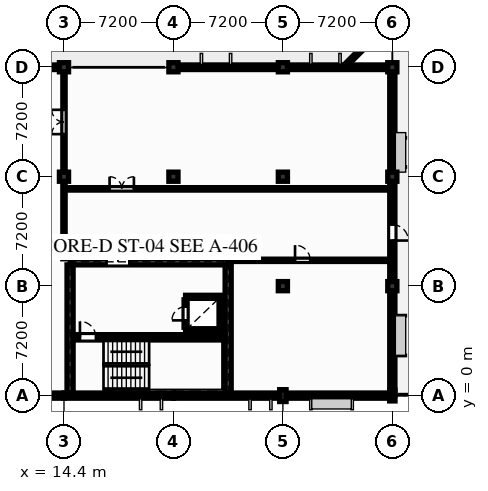
"""IFC4 building model, lengths in metres.
Left out: names, types, materials, properties, quantities, classifications, styles, units other than length and angle.
Written with IfcOpenShell. Run it as: python <this file> out.ifc"""

import sys

from ifc_helpers import new_model, si_unit, direction, frame, frame_2d, origin, origin_2d, place, context, subcontext, project, spatial, rectangle, extrude, element, fill, save


model = new_model("IFC4")
c1 = context("Model", 3, precision=1e-05, world=origin(), true_north=direction((0.0, 1.0)))
c2 = subcontext(c1, "Body", "Model", "MODEL_VIEW")
j1 = project(units=[si_unit("LENGTHUNIT", "METRE"), si_unit("PLANEANGLEUNIT", "RADIAN")], contexts=[c1])
p1 = place(None, origin())
s1 = spatial("IfcSite", under=j1, at=p1, CompositionType="ELEMENT")
p2 = place(p1, origin())
s2 = spatial("IfcBuilding", under=s1, at=p2, CompositionType="ELEMENT")
p3 = place(p2, frame((0.0, 0.0, 8.94)))
s3 = spatial("IfcBuildingStorey", under=s2, at=p3, CompositionType="ELEMENT", Elevation=8.94)
for number, where, z_axis, x_axis in (
    (1, (14.4, 14.4, 0.0), (0.0, 0.0, 1.0), (1.0, 0.0, 0.0)),
    (2, (14.4, 21.6, 0.0), (0.0, 0.0, 1.0), (1.0, 0.0, 0.0)),
    (3, (21.6, 14.4, 0.0), (0.0, 0.0, 1.0), (1.0, 0.0, 0.0)),
    (4, (21.6, 21.6, 0.0), (0.0, 0.0, 1.0), (1.0, 0.0, 0.0)),
):
    element("IfcColumn", number, at=place(p3, frame(where, z_axis=z_axis, x_axis=x_axis)), inside=s3, PredefinedType="COLUMN", context=c2, shape_type="SweptSolid", body=[
        extrude(rectangle(XDim=0.6, YDim=0.6, at=origin_2d()), origin(), (0.0, 0.0, 1.0), 3.84),
    ])
p4 = place(p3, frame((28.8, 0.0, 0.0), z_axis=(0.0, 0.0, 1.0), x_axis=(0.0, 1.0, 0.0)))
e5 = element("IfcColumn", 5, at=p4, inside=s3, PredefinedType="PILASTER", context=c2, shape_type="SweptSolid", body=[
    extrude(rectangle(XDim=0.42, YDim=0.78, at=origin_2d()), origin(), (0.0, 0.0, 1.0), 3.84),
])
for number, where, z_axis, x_axis in (
    (6, (28.8, 7.2, 0.0), (0.0, 0.0, 1.0), (1.0, 0.0, 0.0)),
    (7, (28.8, 14.4, 0.0), (0.0, 0.0, 1.0), (1.0, 0.0, 0.0)),
    (8, (28.8, 21.6, 0.0), (0.0, 0.0, 1.0), (1.0, 0.0, 0.0)),
):
    element("IfcColumn", number, at=place(p3, frame(where, z_axis=z_axis, x_axis=x_axis)), inside=s3, PredefinedType="COLUMN", context=c2, shape_type="SweptSolid", body=[
        extrude(rectangle(XDim=0.6, YDim=0.6, at=origin_2d()), origin(), (0.0, 0.0, 1.0), 3.84),
    ])
p5 = place(p3, frame((36.0, 0.0, 0.0), z_axis=(0.0, 0.0, 1.0), x_axis=(0.0, 1.0, 0.0)))
e9 = element("IfcColumn", 9, at=p5, inside=s3, PredefinedType="PILASTER", context=c2, shape_type="SweptSolid", body=[
    extrude(rectangle(XDim=0.35, YDim=0.7, at=origin_2d()), origin(), (0.0, 0.0, 1.0), 3.84),
])
for number, where, z_axis, x_axis in (
    (10, (36.0, 7.2, 0.0), (0.0, 0.0, 1.0), (1.0, 0.0, 0.0)),
    (11, (36.0, 14.4, 0.0), (0.0, 0.0, 1.0), (1.0, 0.0, 0.0)),
    (12, (36.0, 21.6, 0.0), (0.0, 0.0, 1.0), (1.0, 0.0, 0.0)),
):
    element("IfcColumn", number, at=place(p3, frame(where, z_axis=z_axis, x_axis=x_axis)), inside=s3, PredefinedType="COLUMN", context=c2, shape_type="SweptSolid", body=[
        extrude(rectangle(XDim=0.6, YDim=0.6, at=origin_2d()), origin(), (0.0, 0.0, 1.0), 3.84),
    ])
p6 = place(p3, frame((7.2, 0.0, 0.0), z_axis=(0.0, 0.0, 1.0), x_axis=(1.0, 0.0, 0.0)))
e13 = element("IfcWall", 13, at=p6, inside=s3, PredefinedType="SOLIDWALL", context=c2, shape_type="SweptSolid", body=[
    extrude(rectangle(XDim=7.2, YDim=0.34, at=frame_2d((3.6, 0.0))), origin(), (0.0, 0.0, 1.0), 3.53),
])
p7 = place(p6, frame((2.0, 0.0, 0.85)))
e14 = element("IfcOpeningElement", 14, at=p7, cuts=e13, PredefinedType="OPENING", context=c2, shape_type="SweptSolid", body=[
    extrude(rectangle(XDim=2.4, YDim=2.4, at=frame_2d((1.2, 1.2))), frame((0.0, 0.18, 0.0), z_axis=(0.0, -1.0, 0.0), x_axis=(1.0, 0.0, 0.0)), (0.0, 0.0, 1.0), 0.36),
])
p8 = place(p3, frame((14.4, 0.0, 0.0), z_axis=(0.0, 0.0, 1.0), x_axis=(1.0, 0.0, 0.0)))
e15 = element("IfcWall", 15, at=p8, inside=s3, PredefinedType="SOLIDWALL", context=c2, shape_type="SweptSolid", body=[
    extrude(rectangle(XDim=7.2, YDim=0.34, at=frame_2d((3.6, 0.0))), origin(), (0.0, 0.0, 1.0), 3.53),
])
p9 = place(p8, frame((5.2, 0.0, 1.05)))
e16 = element("IfcOpeningElement", 16, at=p9, cuts=e15, PredefinedType="OPENING", context=c2, shape_type="SweptSolid", body=[
    extrude(rectangle(XDim=1.05, YDim=1.75, at=frame_2d((0.525, 0.875))), frame((0.0, 0.18, 0.0), z_axis=(0.0, -1.0, 0.0), x_axis=(1.0, 0.0, 0.0)), (0.0, 0.0, 1.0), 0.36),
])
p10 = place(p3, frame((21.6, 0.0, 0.0), z_axis=(0.0, 0.0, 1.0), x_axis=(1.0, 0.0, 0.0)))
e17 = element("IfcWall", 17, at=p10, inside=s3, PredefinedType="SOLIDWALL", context=c2, shape_type="SweptSolid", body=[
    extrude(rectangle(XDim=7.2, YDim=0.34, at=frame_2d((3.6, 0.0))), origin(), (0.0, 0.0, 1.0), 3.53),
])
p11 = place(p10, frame((5.2, 0.0, 1.05)))
e18 = element("IfcOpeningElement", 18, at=p11, cuts=e17, PredefinedType="OPENING", context=c2, shape_type="SweptSolid", body=[
    extrude(rectangle(XDim=1.05, YDim=1.75, at=frame_2d((0.525, 0.875))), frame((0.0, 0.18, 0.0), z_axis=(0.0, -1.0, 0.0), x_axis=(1.0, 0.0, 0.0)), (0.0, 0.0, 1.0), 0.36),
])
p12 = place(p3, frame((28.8, 0.0, 0.0), z_axis=(0.0, 0.0, 1.0), x_axis=(1.0, 0.0, 0.0)))
e19 = element("IfcWall", 19, at=p12, inside=s3, PredefinedType="SOLIDWALL", context=c2, shape_type="SweptSolid", body=[
    extrude(rectangle(XDim=7.2, YDim=0.34, at=frame_2d((3.6, 0.0))), origin(), (0.0, 0.0, 1.0), 3.53),
])
p13 = place(p12, frame((2.0, 0.0, 0.355)))
e20 = element("IfcOpeningElement", 20, at=p13, cuts=e19, PredefinedType="OPENING", context=c2, shape_type="SweptSolid", body=[
    extrude(rectangle(XDim=2.4, YDim=2.4, at=frame_2d((1.2, 1.2))), frame((0.0, 0.18, 0.0), z_axis=(0.0, -1.0, 0.0), x_axis=(1.0, 0.0, 0.0)), (0.0, 0.0, 1.0), 0.36),
])
p14 = place(p3, frame((36.0, 0.0, 0.0), z_axis=(0.0, 0.0, 1.0), x_axis=(0.0, 1.0, 0.0)))
e21 = element("IfcWall", 21, at=p14, inside=s3, PredefinedType="SOLIDWALL", context=c2, shape_type="SweptSolid", body=[
    extrude(rectangle(XDim=21.6, YDim=0.34, at=frame_2d((10.8, 0.0))), origin(), (0.0, 0.0, 1.0), 3.53),
])
p15 = place(p14, frame((10.2, 0.0, 0.0)))
e22 = element("IfcOpeningElement", 22, at=p15, cuts=e21, PredefinedType="OPENING", context=c2, shape_type="SweptSolid", body=[
    extrude(rectangle(XDim=1.05, YDim=2.2, at=frame_2d((0.525, 1.1))), frame((0.0, 0.18, 0.0), z_axis=(0.0, -1.0, 0.0), x_axis=(1.0, 0.0, 0.0)), (0.0, 0.0, 1.0), 0.36),
])
p16 = place(p14, frame((2.8, 0.0, 0.9)))
e23 = element("IfcOpeningElement", 23, at=p16, cuts=e21, PredefinedType="OPENING", context=c2, shape_type="SweptSolid", body=[
    extrude(rectangle(XDim=2.3, YDim=1.7, at=frame_2d((1.15, 0.85))), frame((0.0, 0.18, 0.0), z_axis=(0.0, -1.0, 0.0), x_axis=(1.0, 0.0, 0.0)), (0.0, 0.0, 1.0), 0.36),
])
p17 = place(p14, frame((15.2, 0.0, 0.705)))
e24 = element("IfcOpeningElement", 24, at=p17, cuts=e21, PredefinedType="OPENING", context=c2, shape_type="SweptSolid", body=[
    extrude(rectangle(XDim=1.6, YDim=2.05, at=frame_2d((0.8, 1.025))), frame((0.0, 0.18, 0.0), z_axis=(0.0, -1.0, 0.0), x_axis=(1.0, 0.0, 0.0)), (0.0, 0.0, 1.0), 0.36),
])
p18 = place(p3, frame((7.2, 21.6, 0.0), z_axis=(0.0, 0.0, 1.0), x_axis=(1.0, 0.0, 0.0)))
e25 = element("IfcWall", 25, at=p18, inside=s3, PredefinedType="SOLIDWALL", context=c2, shape_type="SweptSolid", body=[
    extrude(rectangle(XDim=7.2, YDim=0.3, at=frame_2d((3.6, 0.0))), origin(), (0.0, 0.0, 1.0), 2.855),
])
p19 = place(p18, frame((2.0, 0.0, 0.685)))
e26 = element("IfcOpeningElement", 26, at=p19, cuts=e25, PredefinedType="OPENING", context=c2, shape_type="SweptSolid", body=[
    extrude(rectangle(XDim=1.6, YDim=2.05, at=frame_2d((0.8, 1.025))), frame((0.0, 0.16, 0.0), z_axis=(0.0, -1.0, 0.0), x_axis=(1.0, 0.0, 0.0)), (0.0, 0.0, 1.0), 0.32),
])
p20 = place(p3, frame((21.6, 21.6, 0.0), z_axis=(0.0, 0.0, 1.0), x_axis=(1.0, 0.0, 0.0)))
e27 = element("IfcWall", 27, at=p20, inside=s3, PredefinedType="SOLIDWALL", context=c2, shape_type="SweptSolid", body=[
    extrude(rectangle(XDim=7.2, YDim=0.3, at=frame_2d((3.6, 0.0))), origin(), (0.0, 0.0, 1.0), 2.855),
])
p21 = place(p20, frame((2.0, 0.0, 0.685)))
e28 = element("IfcOpeningElement", 28, at=p21, cuts=e27, PredefinedType="OPENING", context=c2, shape_type="SweptSolid", body=[
    extrude(rectangle(XDim=1.6, YDim=2.05, at=frame_2d((0.8, 1.025))), frame((0.0, 0.16, 0.0), z_axis=(0.0, -1.0, 0.0), x_axis=(1.0, 0.0, 0.0)), (0.0, 0.0, 1.0), 0.32),
])
p22 = place(p3, frame((28.8, 21.6, 0.0), z_axis=(0.0, 0.0, 1.0), x_axis=(1.0, 0.0, 0.0)))
e29 = element("IfcWall", 29, at=p22, inside=s3, PredefinedType="SOLIDWALL", context=c2, shape_type="SweptSolid", body=[
    extrude(rectangle(XDim=7.2, YDim=0.3, at=frame_2d((3.6, 0.0))), origin(), (0.0, 0.0, 1.0), 2.795),
])
p23 = place(p22, frame((2.0, 0.0, 0.625)))
e30 = element("IfcOpeningElement", 30, at=p23, cuts=e29, PredefinedType="OPENING", context=c2, shape_type="SweptSolid", body=[
    extrude(rectangle(XDim=1.6, YDim=2.05, at=frame_2d((0.8, 1.025))), frame((0.0, 0.16, 0.0), z_axis=(0.0, -1.0, 0.0), x_axis=(1.0, 0.0, 0.0)), (0.0, 0.0, 1.0), 0.32),
])
p24 = place(p3, frame((32.941, 21.741, 0.0), z_axis=(0.0, 0.0, 1.0), x_axis=(0.707106781187, 0.707106781187, 0.0)))
e31 = element("IfcWall", 31, at=p24, inside=s3, PredefinedType="PARAPET", context=c2, shape_type="SweptSolid", body=[
    extrude(rectangle(XDim=4.125, YDim=0.2, at=frame_2d((2.063, 0.0))), origin(), (0.0, 0.0, 1.0), 0.72),
])
p25 = place(p3, frame((14.8, 8.8, 0.0), z_axis=(0.0, 0.0, 1.0), x_axis=(1.0, 0.0, 0.0)))
e32 = element("IfcWall", 32, at=p25, inside=s3, PredefinedType="SHEAR", context=c2, shape_type="SweptSolid", body=[
    extrude(rectangle(XDim=10.4, YDim=0.4, at=frame_2d((5.2, 0.0))), origin(), (0.0, 0.0, 1.0), 3.53),
])
p26 = place(p25, frame((2.4, 0.0, 0.0)))
e33 = element("IfcOpeningElement", 33, at=p26, cuts=e32, PredefinedType="OPENING", context=c2, shape_type="SweptSolid", body=[
    extrude(rectangle(XDim=1.5, YDim=2.2, at=frame_2d((0.75, 1.1))), frame((0.0, 0.21, 0.0), z_axis=(0.0, -1.0, 0.0), x_axis=(1.0, 0.0, 0.0)), (0.0, 0.0, 1.0), 0.42),
])
for number, where, z_axis, x_axis in (
    (34, (14.8, 0.17, 0.0), (0.0, 0.0, 1.0), (0.0, 1.0, 0.0)),
    (35, (25.2, 0.17, 0.0), (0.0, 0.0, 1.0), (0.0, 1.0, 0.0)),
):
    element("IfcWall", number, at=place(p3, frame(where, z_axis=z_axis, x_axis=x_axis)), inside=s3, PredefinedType="SHEAR", context=c2, shape_type="SweptSolid", body=[
        extrude(rectangle(XDim=8.43, YDim=0.4, at=frame_2d((4.215, 0.0))), origin(), (0.0, 0.0, 1.0), 3.53),
    ])
p27 = place(p3, frame((15.0, 3.835, 0.0), z_axis=(0.0, 0.0, 1.0), x_axis=(1.0, 0.0, 0.0)))
e36 = element("IfcWall", 36, at=p27, inside=s3, PredefinedType="SHEAR", context=c2, shape_type="SweptSolid", body=[
    extrude(rectangle(XDim=10.0, YDim=0.35, at=frame_2d((5.0, 0.0))), origin(), (0.0, 0.0, 1.0), 3.53),
])
p28 = place(p27, frame((0.45, 0.0, 0.0)))
e37 = element("IfcOpeningElement", 37, at=p28, cuts=e36, PredefinedType="OPENING", context=c2, shape_type="SweptSolid", body=[
    extrude(rectangle(XDim=1.05, YDim=2.2, at=frame_2d((0.525, 1.1))), frame((0.0, 0.185, 0.0), z_axis=(0.0, -1.0, 0.0), x_axis=(1.0, 0.0, 0.0)), (0.0, 0.0, 1.0), 0.37),
])
for number, where, z_axis, x_axis in (
    (38, (22.4, 4.3, 0.0), (0.0, 0.0, 1.0), (1.0, 0.0, 0.0)),
    (39, (22.4, 6.5, 0.0), (0.0, 0.0, 1.0), (1.0, 0.0, 0.0)),
):
    element("IfcWall", number, at=place(p3, frame(where, z_axis=z_axis, x_axis=x_axis)), inside=s3, PredefinedType="PARTITIONING", context=c2, shape_type="SweptSolid", body=[
        extrude(rectangle(XDim=2.3, YDim=0.2, at=frame_2d((1.15, 0.0))), origin(), (0.0, 0.0, 1.0), 3.53),
    ])
p29 = place(p3, frame((22.4, 4.5, 0.0), z_axis=(0.0, 0.0, 1.0), x_axis=(0.0, 1.0, 0.0)))
e40 = element("IfcWall", 40, at=p29, inside=s3, PredefinedType="PARTITIONING", context=c2, shape_type="SweptSolid", body=[
    extrude(rectangle(XDim=1.8, YDim=0.2, at=frame_2d((0.9, 0.0))), origin(), (0.0, 0.0, 1.0), 3.53),
])
p30 = place(p29, frame((0.45, 0.0, 0.0)))
e41 = element("IfcOpeningElement", 41, at=p30, cuts=e40, PredefinedType="OPENING", context=c2, shape_type="SweptSolid", body=[
    extrude(rectangle(XDim=0.9, YDim=2.1, at=frame_2d((0.45, 1.05))), frame((0.0, 0.11, 0.0), z_axis=(0.0, -1.0, 0.0), x_axis=(1.0, 0.0, 0.0)), (0.0, 0.0, 1.0), 0.22),
])
p31 = place(p3, frame((24.7, 4.5, 0.0), z_axis=(0.0, 0.0, 1.0), x_axis=(0.0, 1.0, 0.0)))
e42 = element("IfcWall", 42, at=p31, inside=s3, PredefinedType="PARTITIONING", context=c2, shape_type="SweptSolid", body=[
    extrude(rectangle(XDim=1.8, YDim=0.2, at=frame_2d((0.9, 0.0))), origin(), (0.0, 0.0, 1.0), 3.53),
])
p32 = place(p3, frame((14.4, 9.0, 0.0), z_axis=(0.0, 0.0, 1.0), x_axis=(0.0, 1.0, 0.0)))
e43 = element("IfcWall", 43, at=p32, inside=s3, PredefinedType="PARTITIONING", context=c2, shape_type="SweptSolid", body=[
    extrude(rectangle(XDim=12.6, YDim=0.15, at=frame_2d((6.3, 0.0))), origin(), (0.0, 0.0, 1.0), 2.755),
])
p33 = place(p32, frame((8.2, 0.0, 0.0)))
e44 = element("IfcOpeningElement", 44, at=p33, cuts=e43, PredefinedType="OPENING", context=c2, shape_type="SweptSolid", body=[
    extrude(rectangle(XDim=1.6, YDim=2.2, at=frame_2d((0.8, 1.1))), frame((0.0, 0.085, 0.0), z_axis=(0.0, -1.0, 0.0), x_axis=(1.0, 0.0, 0.0)), (0.0, 0.0, 1.0), 0.17),
])
p34 = place(p3, frame((14.6, 13.6, 0.0), z_axis=(0.0, 0.0, 1.0), x_axis=(1.0, 0.0, 0.0)))
e45 = element("IfcWall", 45, at=p34, inside=s3, PredefinedType="PARTITIONING", context=c2, shape_type="SweptSolid", body=[
    extrude(rectangle(XDim=21.4, YDim=0.16, at=frame_2d((10.7, 0.0))), origin(), (0.0, 0.0, 1.0), 3.53),
])
p35 = place(p34, frame((2.8, 0.0, 0.0)))
e46 = element("IfcOpeningElement", 46, at=p35, cuts=e45, PredefinedType="OPENING", context=c2, shape_type="SweptSolid", body=[
    extrude(rectangle(XDim=1.6, YDim=2.2, at=frame_2d((0.8, 1.1))), frame((0.0, 0.09, 0.0), z_axis=(0.0, -1.0, 0.0), x_axis=(1.0, 0.0, 0.0)), (0.0, 0.0, 1.0), 0.18),
])
p36 = place(p3, frame((25.4, 8.9, 0.0), z_axis=(0.0, 0.0, 1.0), x_axis=(1.0, 0.0, 0.0)))
e47 = element("IfcWall", 47, at=p36, inside=s3, PredefinedType="PARTITIONING", context=c2, shape_type="SweptSolid", body=[
    extrude(rectangle(XDim=10.6, YDim=0.15, at=frame_2d((5.3, 0.0))), origin(), (0.0, 0.0, 1.0), 3.53),
])
p37 = place(p36, frame((4.2, 0.0, 0.0)))
e48 = element("IfcOpeningElement", 48, at=p37, cuts=e47, PredefinedType="OPENING", context=c2, shape_type="SweptSolid", body=[
    extrude(rectangle(XDim=1.0, YDim=2.15, at=frame_2d((0.5, 1.075))), frame((0.0, 0.085, 0.0), z_axis=(0.0, -1.0, 0.0), x_axis=(1.0, 0.0, 0.0)), (0.0, 0.0, 1.0), 0.17),
])
p38 = place(p9, origin())
e49 = element("IfcWindow", 49, at=p38, inside=s3, PartitioningType="SINGLE_PANEL", PredefinedType="WINDOW", context=c2, shape_type="SweptSolid", body=[
    extrude(rectangle(XDim=1.05, YDim=1.75, at=frame_2d((0.525, 0.875))), frame((0.0, 0.03, 0.0), z_axis=(0.0, -1.0, 0.0), x_axis=(1.0, 0.0, 0.0)), (0.0, 0.0, 1.0), 0.06),
])
fill(e16, e49)
p39 = place(p11, origin())
e50 = element("IfcWindow", 50, at=p39, inside=s3, PartitioningType="SINGLE_PANEL", PredefinedType="WINDOW", context=c2, shape_type="SweptSolid", body=[
    extrude(rectangle(XDim=1.05, YDim=1.75, at=frame_2d((0.525, 0.875))), frame((0.0, 0.03, 0.0), z_axis=(0.0, -1.0, 0.0), x_axis=(1.0, 0.0, 0.0)), (0.0, 0.0, 1.0), 0.06),
])
fill(e18, e50)
p40 = place(p13, origin())
e51 = element("IfcWindow", 51, at=p40, inside=s3, PartitioningType="SINGLE_PANEL", PredefinedType="WINDOW", context=c2, shape_type="SweptSolid", body=[
    extrude(rectangle(XDim=2.4, YDim=2.4, at=frame_2d((1.2, 1.2))), frame((0.0, 0.03, 0.0), z_axis=(0.0, -1.0, 0.0), x_axis=(1.0, 0.0, 0.0)), (0.0, 0.0, 1.0), 0.06),
])
fill(e20, e51)
p41 = place(p15, frame((1.05, 0.0, 0.0), z_axis=(0.0, 0.0, 1.0), x_axis=(-1.0, 0.0, 0.0)))
e52 = element("IfcDoor", 52, at=p41, inside=s3, OperationType="SINGLE_SWING_LEFT", PredefinedType="DOOR", context=c2, shape_type="SweptSolid", body=[
    extrude(rectangle(XDim=1.05, YDim=2.2, at=frame_2d((0.525, 1.1))), frame((0.0, 0.025, 0.0), z_axis=(0.0, -1.0, 0.0), x_axis=(1.0, 0.0, 0.0)), (0.0, 0.0, 1.0), 0.05),
])
fill(e22, e52)
p42 = place(p16, origin())
e53 = element("IfcWindow", 53, at=p42, inside=s3, PartitioningType="SINGLE_PANEL", PredefinedType="WINDOW", context=c2, shape_type="SweptSolid", body=[
    extrude(rectangle(XDim=2.3, YDim=1.7, at=frame_2d((1.15, 0.85))), frame((0.0, 0.03, 0.0), z_axis=(0.0, -1.0, 0.0), x_axis=(1.0, 0.0, 0.0)), (0.0, 0.0, 1.0), 0.06),
])
fill(e23, e53)
p43 = place(p17, origin())
e54 = element("IfcWindow", 54, at=p43, inside=s3, PartitioningType="SINGLE_PANEL", PredefinedType="WINDOW", context=c2, shape_type="SweptSolid", body=[
    extrude(rectangle(XDim=1.6, YDim=2.05, at=frame_2d((0.8, 1.025))), frame((0.0, 0.03, 0.0), z_axis=(0.0, -1.0, 0.0), x_axis=(1.0, 0.0, 0.0)), (0.0, 0.0, 1.0), 0.06),
])
fill(e24, e54)
p44 = place(p21, origin())
e55 = element("IfcWindow", 55, at=p44, inside=s3, PartitioningType="SINGLE_PANEL", PredefinedType="WINDOW", context=c2, shape_type="SweptSolid", body=[
    extrude(rectangle(XDim=1.6, YDim=2.05, at=frame_2d((0.8, 1.025))), frame((0.0, 0.03, 0.0), z_axis=(0.0, -1.0, 0.0), x_axis=(1.0, 0.0, 0.0)), (0.0, 0.0, 1.0), 0.06),
])
fill(e28, e55)
p45 = place(p23, origin())
e56 = element("IfcWindow", 56, at=p45, inside=s3, PartitioningType="SINGLE_PANEL", PredefinedType="WINDOW", context=c2, shape_type="SweptSolid", body=[
    extrude(rectangle(XDim=1.6, YDim=2.05, at=frame_2d((0.8, 1.025))), frame((0.0, 0.03, 0.0), z_axis=(0.0, -1.0, 0.0), x_axis=(1.0, 0.0, 0.0)), (0.0, 0.0, 1.0), 0.06),
])
fill(e30, e56)
p46 = place(p26, origin())
e57 = element("IfcDoor", 57, at=p46, inside=s3, OperationType="DOUBLE_DOOR_SINGLE_SWING", PredefinedType="DOOR", context=c2, shape_type="SweptSolid", body=[
    extrude(rectangle(XDim=1.5, YDim=2.2, at=frame_2d((0.75, 1.1))), frame((0.0, 0.025, 0.0), z_axis=(0.0, -1.0, 0.0), x_axis=(1.0, 0.0, 0.0)), (0.0, 0.0, 1.0), 0.05),
])
fill(e33, e57)
p47 = place(p28, origin())
e58 = element("IfcDoor", 58, at=p47, inside=s3, OperationType="SINGLE_SWING_LEFT", PredefinedType="DOOR", context=c2, shape_type="SweptSolid", body=[
    extrude(rectangle(XDim=1.05, YDim=2.2, at=frame_2d((0.525, 1.1))), frame((0.0, 0.025, 0.0), z_axis=(0.0, -1.0, 0.0), x_axis=(1.0, 0.0, 0.0)), (0.0, 0.0, 1.0), 0.05),
])
fill(e37, e58)
p48 = place(p30, origin())
e59 = element("IfcDoor", 59, at=p48, inside=s3, OperationType="SINGLE_SWING_LEFT", PredefinedType="DOOR", context=c2, shape_type="SweptSolid", body=[
    extrude(rectangle(XDim=0.9, YDim=2.1, at=frame_2d((0.45, 1.05))), frame((0.0, 0.025, 0.0), z_axis=(0.0, -1.0, 0.0), x_axis=(1.0, 0.0, 0.0)), (0.0, 0.0, 1.0), 0.05),
])
fill(e41, e59)
p49 = place(p33, origin())
e60 = element("IfcDoor", 60, at=p49, inside=s3, OperationType="DOUBLE_DOOR_SINGLE_SWING", PredefinedType="DOOR", context=c2, shape_type="SweptSolid", body=[
    extrude(rectangle(XDim=1.6, YDim=2.2, at=frame_2d((0.8, 1.1))), frame((0.0, 0.025, 0.0), z_axis=(0.0, -1.0, 0.0), x_axis=(1.0, 0.0, 0.0)), (0.0, 0.0, 1.0), 0.05),
])
fill(e44, e60)
p50 = place(p35, origin())
e61 = element("IfcDoor", 61, at=p50, inside=s3, OperationType="DOUBLE_DOOR_SINGLE_SWING", PredefinedType="DOOR", context=c2, shape_type="SweptSolid", body=[
    extrude(rectangle(XDim=1.6, YDim=2.2, at=frame_2d((0.8, 1.1))), frame((0.0, 0.025, 0.0), z_axis=(0.0, -1.0, 0.0), x_axis=(1.0, 0.0, 0.0)), (0.0, 0.0, 1.0), 0.05),
])
fill(e46, e61)
p51 = place(p37, origin())
e62 = element("IfcDoor", 62, at=p51, inside=s3, OperationType="SINGLE_SWING_LEFT", PredefinedType="DOOR", context=c2, shape_type="SweptSolid", body=[
    extrude(rectangle(XDim=1.0, YDim=2.15, at=frame_2d((0.5, 1.075))), frame((0.0, 0.025, 0.0), z_axis=(0.0, -1.0, 0.0), x_axis=(1.0, 0.0, 0.0)), (0.0, 0.0, 1.0), 0.05),
])
fill(e48, e62)
save(model, sys.argv[1])
